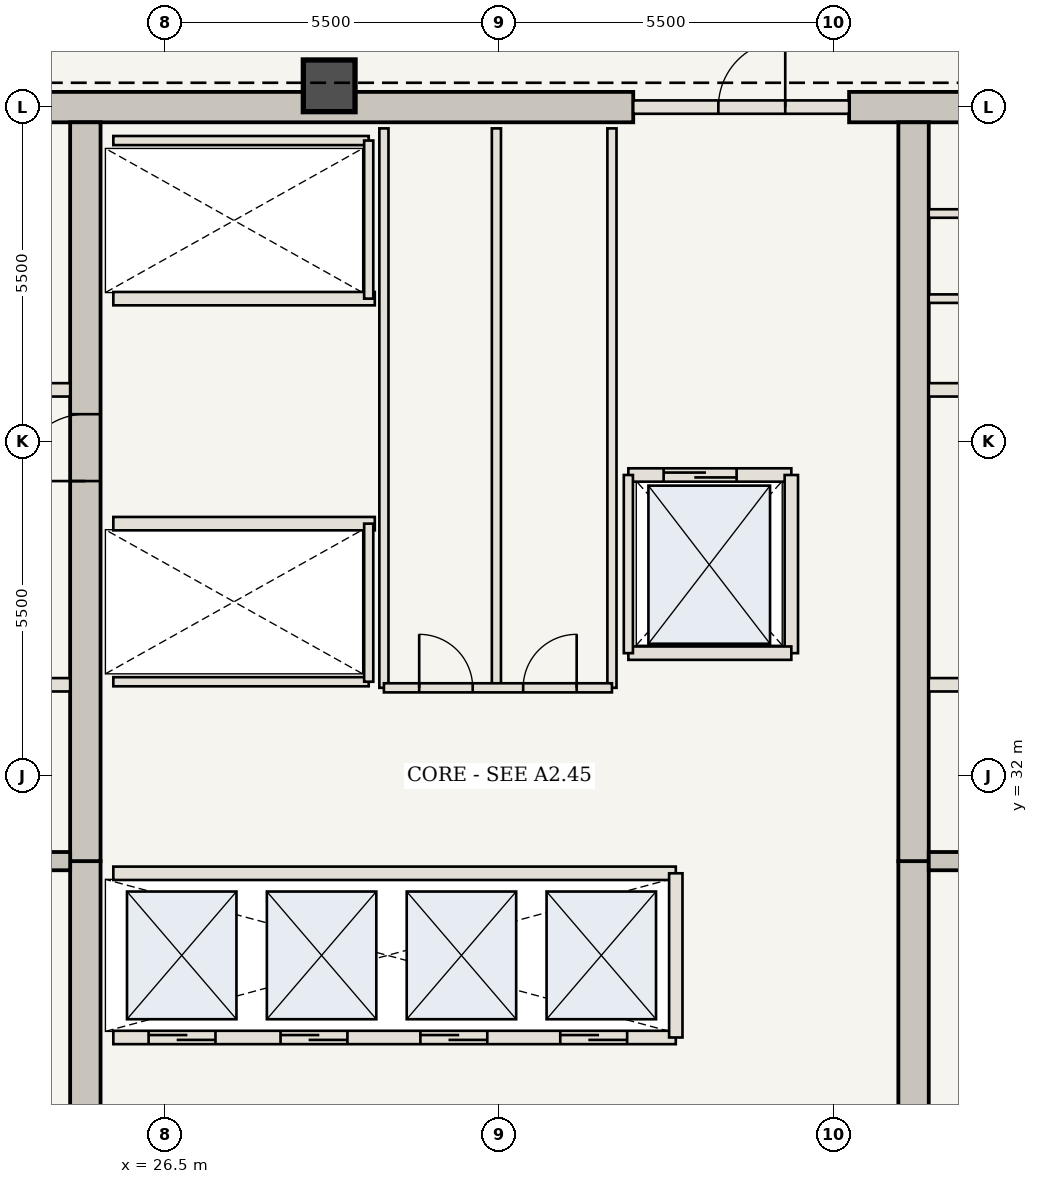
"""IFC4 building model, lengths in metres.
Left out: names, types, materials, properties, quantities, classifications, styles, units other than length and angle.
Written with IfcOpenShell. Run it as: python <this file> out.ifc"""

import sys

from ifc_helpers import new_model, si_unit, direction, frame, frame_2d, origin, origin_2d, place, context, subcontext, project, spatial, rectangle, extrude, element, fill, save


model = new_model("IFC4")
c1 = context("Model", 3, precision=1e-05, world=origin(), true_north=direction((0.0, 1.0)))
c2 = subcontext(c1, "Body", "Model", "MODEL_VIEW")
j1 = project(units=[si_unit("LENGTHUNIT", "METRE"), si_unit("PLANEANGLEUNIT", "RADIAN")], contexts=[c1])
p1 = place(None, origin())
s1 = spatial("IfcSite", under=j1, at=p1, CompositionType="ELEMENT")
p2 = place(p1, origin())
s2 = spatial("IfcBuilding", under=s1, at=p2, CompositionType="ELEMENT")
p3 = place(p2, frame((0.0, 0.0, 202.3)))
s3 = spatial("IfcBuildingStorey", under=s2, at=p3, CompositionType="ELEMENT", Elevation=202.3)
p4 = place(p3, frame((21.41, 43.0, 0.0), z_axis=(0.0, 0.0, 1.0), x_axis=(1.0, 0.0, 0.0)))
e1 = element("IfcWall", 1, at=p4, inside=s3, PredefinedType="SHEAR", context=c2, shape_type="SweptSolid", body=[
    extrude(rectangle(XDim=12.79, YDim=0.5, at=frame_2d((6.395, 0.0))), origin(), (0.0, 0.0, 1.0), 3.85),
])
p5 = place(p3, frame((37.75, 43.0, 0.0), z_axis=(0.0, 0.0, 1.0), x_axis=(1.0, 0.0, 0.0)))
e2 = element("IfcWall", 2, at=p5, inside=s3, PredefinedType="SHEAR", context=c2, shape_type="SweptSolid", body=[
    extrude(rectangle(XDim=4.84, YDim=0.5, at=frame_2d((2.42, 0.0))), origin(), (0.0, 0.0, 1.0), 3.85),
])
p6 = place(p3, frame((25.19, 21.2, 0.0), z_axis=(0.0, 0.0, 1.0), x_axis=(0.0, 1.0, 0.0)))
e3 = element("IfcWall", 3, at=p6, inside=s3, PredefinedType="SHEAR", context=c2, shape_type="SweptSolid", body=[
    extrude(rectangle(XDim=9.4, YDim=0.5, at=frame_2d((4.7, 0.0))), origin(), (0.0, 0.0, 1.0), 3.85),
])
p7 = place(p3, frame((25.19, 30.6, 0.0), z_axis=(0.0, 0.0, 1.0), x_axis=(0.0, 1.0, 0.0)))
e4 = element("IfcWall", 4, at=p7, inside=s3, PredefinedType="SHEAR", context=c2, shape_type="SweptSolid", body=[
    extrude(rectangle(XDim=12.15, YDim=0.5, at=frame_2d((6.075, 0.0))), origin(), (0.0, 0.0, 1.0), 3.85),
])
p8 = place(p7, frame((6.25, 0.0, 0.0)))
e5 = element("IfcOpeningElement", 5, at=p8, cuts=e4, PredefinedType="OPENING", context=c2, shape_type="SweptSolid", body=[
    extrude(rectangle(XDim=1.1, YDim=2.15, at=frame_2d((0.55, 1.075))), frame((0.0, 0.26, 0.0), z_axis=(0.0, -1.0, 0.0), x_axis=(1.0, 0.0, 0.0)), (0.0, 0.0, 1.0), 0.52),
])
p9 = place(p3, frame((38.81, 21.2, 0.0), z_axis=(0.0, 0.0, 1.0), x_axis=(0.0, 1.0, 0.0)))
e6 = element("IfcWall", 6, at=p9, inside=s3, PredefinedType="SHEAR", context=c2, shape_type="SweptSolid", body=[
    extrude(rectangle(XDim=9.4, YDim=0.5, at=frame_2d((4.7, 0.0))), origin(), (0.0, 0.0, 1.0), 3.85),
])
p10 = place(p3, frame((38.81, 30.6, 0.0), z_axis=(0.0, 0.0, 1.0), x_axis=(0.0, 1.0, 0.0)))
e7 = element("IfcWall", 7, at=p10, inside=s3, PredefinedType="SHEAR", context=c2, shape_type="SweptSolid", body=[
    extrude(rectangle(XDim=12.15, YDim=0.5, at=frame_2d((6.075, 0.0))), origin(), (0.0, 0.0, 1.0), 3.85),
])
p11 = place(p3, frame((29.2, 43.35, 0.0), z_axis=(0.0, 0.0, 1.0), x_axis=(1.0, 0.0, 0.0)))
e8 = element("IfcColumn", 8, at=p11, inside=s3, PredefinedType="COLUMN", context=c2, shape_type="SweptSolid", body=[
    extrude(rectangle(XDim=0.85, YDim=0.85, at=origin_2d()), origin(), (0.0, 0.0, 1.0), 3.85),
])
for number, where, z_axis, x_axis in (
    (9, (21.41, 30.6, 0.0), (0.0, 0.0, 1.0), (1.0, 0.0, 0.0)),
    (10, (39.06, 30.6, 0.0), (0.0, 0.0, 1.0), (1.0, 0.0, 0.0)),
):
    element("IfcWall", number, at=place(p3, frame(where, z_axis=z_axis, x_axis=x_axis)), inside=s3, PredefinedType="SHEAR", context=c2, shape_type="SweptSolid", body=[
        extrude(rectangle(XDim=3.53, YDim=0.3, at=frame_2d((1.765, 0.0))), origin(), (0.0, 0.0, 1.0), 3.685),
    ])
p12 = place(p3, frame((21.41, 33.5, 0.0), z_axis=(0.0, 0.0, 1.0), x_axis=(1.0, 0.0, 0.0)))
e11 = element("IfcWall", 11, at=p12, inside=s3, PredefinedType="STANDARD", context=c2, shape_type="SweptSolid", body=[
    extrude(rectangle(XDim=3.53, YDim=0.22, at=frame_2d((1.765, 0.0))), origin(), (0.0, 0.0, 1.0), 3.685),
])
p13 = place(p12, frame((0.75, 0.0, 0.0)))
e12 = element("IfcOpeningElement", 12, at=p13, cuts=e11, PredefinedType="OPENING", context=c2, shape_type="SweptSolid", body=[
    extrude(rectangle(XDim=1.2, YDim=2.2, at=frame_2d((0.6, 1.1))), frame((0.0, 0.12, 0.0), z_axis=(0.0, -1.0, 0.0), x_axis=(1.0, 0.0, 0.0)), (0.0, 0.0, 1.0), 0.24),
])
p14 = place(p3, frame((39.06, 33.5, 0.0), z_axis=(0.0, 0.0, 1.0), x_axis=(1.0, 0.0, 0.0)))
e13 = element("IfcWall", 13, at=p14, inside=s3, PredefinedType="STANDARD", context=c2, shape_type="SweptSolid", body=[
    extrude(rectangle(XDim=3.53, YDim=0.22, at=frame_2d((1.765, 0.0))), origin(), (0.0, 0.0, 1.0), 3.685),
])
p15 = place(p14, frame((1.55, 0.0, 0.0)))
e14 = element("IfcOpeningElement", 14, at=p15, cuts=e13, PredefinedType="OPENING", context=c2, shape_type="SweptSolid", body=[
    extrude(rectangle(XDim=1.2, YDim=2.2, at=frame_2d((0.6, 1.1))), frame((0.0, 0.12, 0.0), z_axis=(0.0, -1.0, 0.0), x_axis=(1.0, 0.0, 0.0)), (0.0, 0.0, 1.0), 0.24),
])
for number, where, z_axis, x_axis in (
    (15, (21.41, 38.35, 0.0), (0.0, 0.0, 1.0), (1.0, 0.0, 0.0)),
    (16, (39.06, 38.35, 0.0), (0.0, 0.0, 1.0), (1.0, 0.0, 0.0)),
):
    element("IfcWall", number, at=place(p3, frame(where, z_axis=z_axis, x_axis=x_axis)), inside=s3, PredefinedType="STANDARD", context=c2, shape_type="SweptSolid", body=[
        extrude(rectangle(XDim=3.53, YDim=0.22, at=frame_2d((1.765, 0.0))), origin(), (0.0, 0.0, 1.0), 3.685),
    ])
for number, where, z_axis, x_axis in (
    (17, (39.06, 39.85, 0.0), (0.0, 0.0, 1.0), (1.0, 0.0, 0.0)),
    (18, (39.06, 41.25, 0.0), (0.0, 0.0, 1.0), (1.0, 0.0, 0.0)),
):
    element("IfcWall", number, at=place(p3, frame(where, z_axis=z_axis, x_axis=x_axis)), inside=s3, PredefinedType="STANDARD", context=c2, shape_type="SweptSolid", body=[
        extrude(rectangle(XDim=3.53, YDim=0.14, at=frame_2d((1.765, 0.0))), origin(), (0.0, 0.0, 1.0), 3.685),
    ])
p16 = place(p3, frame((25.65, 27.7, 0.0), z_axis=(0.0, 0.0, 1.0), x_axis=(1.0, 0.0, 0.0)))
e19 = element("IfcWall", 19, at=p16, inside=s3, PredefinedType="STANDARD", context=c2, shape_type="SweptSolid", body=[
    extrude(rectangle(XDim=9.25, YDim=0.22, at=frame_2d((4.625, 0.0))), origin(), (0.0, 0.0, 1.0), 3.685),
])
p17 = place(p16, frame((0.58, 0.0, 0.0)))
e20 = element("IfcOpeningElement", 20, at=p17, cuts=e19, PredefinedType="OPENING", context=c2, shape_type="SweptSolid", body=[
    extrude(rectangle(XDim=1.1, YDim=2.15, at=frame_2d((0.55, 1.075))), frame((0.0, 0.12, 0.0), z_axis=(0.0, -1.0, 0.0), x_axis=(1.0, 0.0, 0.0)), (0.0, 0.0, 1.0), 0.24),
])
p18 = place(p16, frame((2.75, 0.0, 0.0)))
e21 = element("IfcOpeningElement", 21, at=p18, cuts=e19, PredefinedType="OPENING", context=c2, shape_type="SweptSolid", body=[
    extrude(rectangle(XDim=1.1, YDim=2.15, at=frame_2d((0.55, 1.075))), frame((0.0, 0.12, 0.0), z_axis=(0.0, -1.0, 0.0), x_axis=(1.0, 0.0, 0.0)), (0.0, 0.0, 1.0), 0.24),
])
p19 = place(p16, frame((5.05, 0.0, 0.0)))
e22 = element("IfcOpeningElement", 22, at=p19, cuts=e19, PredefinedType="OPENING", context=c2, shape_type="SweptSolid", body=[
    extrude(rectangle(XDim=1.1, YDim=2.15, at=frame_2d((0.55, 1.075))), frame((0.0, 0.12, 0.0), z_axis=(0.0, -1.0, 0.0), x_axis=(1.0, 0.0, 0.0)), (0.0, 0.0, 1.0), 0.24),
])
p20 = place(p16, frame((7.35, 0.0, 0.0)))
e23 = element("IfcOpeningElement", 23, at=p20, cuts=e19, PredefinedType="OPENING", context=c2, shape_type="SweptSolid", body=[
    extrude(rectangle(XDim=1.1, YDim=2.15, at=frame_2d((0.55, 1.075))), frame((0.0, 0.12, 0.0), z_axis=(0.0, -1.0, 0.0), x_axis=(1.0, 0.0, 0.0)), (0.0, 0.0, 1.0), 0.24),
])
p21 = place(p3, frame((25.65, 30.4, 0.0), z_axis=(0.0, 0.0, 1.0), x_axis=(1.0, 0.0, 0.0)))
e24 = element("IfcWall", 24, at=p21, inside=s3, PredefinedType="STANDARD", context=c2, shape_type="SweptSolid", body=[
    extrude(rectangle(XDim=9.25, YDim=0.22, at=frame_2d((4.625, 0.0))), origin(), (0.0, 0.0, 1.0), 3.685),
])
p22 = place(p3, frame((34.9, 27.7, 0.0), z_axis=(0.0, 0.0, 1.0), x_axis=(0.0, 1.0, 0.0)))
e25 = element("IfcWall", 25, at=p22, inside=s3, PredefinedType="STANDARD", context=c2, shape_type="SweptSolid", body=[
    extrude(rectangle(XDim=2.7, YDim=0.22, at=frame_2d((1.35, 0.0))), origin(), (0.0, 0.0, 1.0), 3.685),
])
p23 = place(p3, frame((25.65, 36.15, 0.0), z_axis=(0.0, 0.0, 1.0), x_axis=(1.0, 0.0, 0.0)))
e26 = element("IfcWall", 26, at=p23, inside=s3, PredefinedType="STANDARD", context=c2, shape_type="SweptSolid", body=[
    extrude(rectangle(XDim=4.3, YDim=0.22, at=frame_2d((2.15, 0.0))), origin(), (0.0, 0.0, 1.0), 3.685),
])
p24 = place(p3, frame((25.65, 33.55, 0.0), z_axis=(0.0, 0.0, 1.0), x_axis=(1.0, 0.0, 0.0)))
e27 = element("IfcWall", 27, at=p24, inside=s3, PredefinedType="STANDARD", context=c2, shape_type="SweptSolid", body=[
    extrude(rectangle(XDim=4.2, YDim=0.15, at=frame_2d((2.1, 0.0))), origin(), (0.0, 0.0, 1.0), 3.685),
])
p25 = place(p3, frame((29.85, 33.55, 0.0), z_axis=(0.0, 0.0, 1.0), x_axis=(0.0, 1.0, 0.0)))
e28 = element("IfcWall", 28, at=p25, inside=s3, PredefinedType="STANDARD", context=c2, shape_type="SweptSolid", body=[
    extrude(rectangle(XDim=2.6, YDim=0.15, at=frame_2d((1.3, 0.0))), origin(), (0.0, 0.0, 1.0), 3.685),
])
p26 = place(p3, frame((25.65, 39.85, 0.0), z_axis=(0.0, 0.0, 1.0), x_axis=(1.0, 0.0, 0.0)))
e29 = element("IfcWall", 29, at=p26, inside=s3, PredefinedType="STANDARD", context=c2, shape_type="SweptSolid", body=[
    extrude(rectangle(XDim=4.3, YDim=0.22, at=frame_2d((2.15, 0.0))), origin(), (0.0, 0.0, 1.0), 3.685),
])
p27 = place(p3, frame((25.65, 42.45, 0.0), z_axis=(0.0, 0.0, 1.0), x_axis=(1.0, 0.0, 0.0)))
e30 = element("IfcWall", 30, at=p27, inside=s3, PredefinedType="STANDARD", context=c2, shape_type="SweptSolid", body=[
    extrude(rectangle(XDim=4.2, YDim=0.15, at=frame_2d((2.1, 0.0))), origin(), (0.0, 0.0, 1.0), 3.685),
])
p28 = place(p3, frame((29.85, 39.85, 0.0), z_axis=(0.0, 0.0, 1.0), x_axis=(0.0, 1.0, 0.0)))
e31 = element("IfcWall", 31, at=p28, inside=s3, PredefinedType="STANDARD", context=c2, shape_type="SweptSolid", body=[
    extrude(rectangle(XDim=2.6, YDim=0.15, at=frame_2d((1.3, 0.0))), origin(), (0.0, 0.0, 1.0), 3.685),
])
for number, where, z_axis, x_axis in (
    (32, (30.1, 33.45, 0.0), (0.0, 0.0, 1.0), (0.0, 1.0, 0.0)),
    (33, (31.95, 33.45, 0.0), (0.0, 0.0, 1.0), (0.0, 1.0, 0.0)),
    (34, (33.85, 33.45, 0.0), (0.0, 0.0, 1.0), (0.0, 1.0, 0.0)),
):
    element("IfcWall", number, at=place(p3, frame(where, z_axis=z_axis, x_axis=x_axis)), inside=s3, PredefinedType="STANDARD", context=c2, shape_type="SweptSolid", body=[
        extrude(rectangle(XDim=9.2, YDim=0.15, at=frame_2d((4.6, 0.0))), origin(), (0.0, 0.0, 1.0), 3.685),
    ])
p29 = place(p3, frame((30.1, 33.45, 0.0), z_axis=(0.0, 0.0, 1.0), x_axis=(1.0, 0.0, 0.0)))
e35 = element("IfcWall", 35, at=p29, inside=s3, PredefinedType="STANDARD", context=c2, shape_type="SweptSolid", body=[
    extrude(rectangle(XDim=3.75, YDim=0.15, at=frame_2d((1.875, 0.0))), origin(), (0.0, 0.0, 1.0), 3.685),
])
p30 = place(p29, frame((0.58, 0.0, 0.0)))
e36 = element("IfcOpeningElement", 36, at=p30, cuts=e35, PredefinedType="OPENING", context=c2, shape_type="SweptSolid", body=[
    extrude(rectangle(XDim=0.88, YDim=2.1, at=frame_2d((0.44, 1.05))), frame((0.0, 0.085, 0.0), z_axis=(0.0, -1.0, 0.0), x_axis=(1.0, 0.0, 0.0)), (0.0, 0.0, 1.0), 0.17),
])
p31 = place(p29, frame((2.29, 0.0, 0.0)))
e37 = element("IfcOpeningElement", 37, at=p31, cuts=e35, PredefinedType="OPENING", context=c2, shape_type="SweptSolid", body=[
    extrude(rectangle(XDim=0.88, YDim=2.1, at=frame_2d((0.44, 1.05))), frame((0.0, 0.085, 0.0), z_axis=(0.0, -1.0, 0.0), x_axis=(1.0, 0.0, 0.0)), (0.0, 0.0, 1.0), 0.17),
])
p32 = place(p3, frame((34.2, 43.0, 0.0), z_axis=(0.0, 0.0, 1.0), x_axis=(1.0, 0.0, 0.0)))
e38 = element("IfcWall", 38, at=p32, inside=s3, PredefinedType="STANDARD", context=c2, shape_type="SweptSolid", body=[
    extrude(rectangle(XDim=3.55, YDim=0.22, at=frame_2d((1.775, 0.0))), origin(), (0.0, 0.0, 1.0), 3.685),
])
p33 = place(p32, frame((1.4, 0.0, 0.0)))
e39 = element("IfcOpeningElement", 39, at=p33, cuts=e38, PredefinedType="OPENING", context=c2, shape_type="SweptSolid", body=[
    extrude(rectangle(XDim=1.1, YDim=2.15, at=frame_2d((0.55, 1.075))), frame((0.0, 0.12, 0.0), z_axis=(0.0, -1.0, 0.0), x_axis=(1.0, 0.0, 0.0)), (0.0, 0.0, 1.0), 0.24),
])
p34 = place(p3, frame((34.12, 36.95, 0.0), z_axis=(0.0, 0.0, 1.0), x_axis=(1.0, 0.0, 0.0)))
e40 = element("IfcWall", 40, at=p34, inside=s3, PredefinedType="STANDARD", context=c2, shape_type="SweptSolid", body=[
    extrude(rectangle(XDim=2.68, YDim=0.22, at=frame_2d((1.34, 0.0))), origin(), (0.0, 0.0, 1.0), 3.685),
])
p35 = place(p34, frame((0.58, 0.0, 0.0)))
e41 = element("IfcOpeningElement", 41, at=p35, cuts=e40, PredefinedType="OPENING", context=c2, shape_type="SweptSolid", body=[
    extrude(rectangle(XDim=1.2, YDim=2.2, at=frame_2d((0.6, 1.1))), frame((0.0, 0.12, 0.0), z_axis=(0.0, -1.0, 0.0), x_axis=(1.0, 0.0, 0.0)), (0.0, 0.0, 1.0), 0.24),
])
p36 = place(p3, frame((36.8, 34.02, 0.0), z_axis=(0.0, 0.0, 1.0), x_axis=(0.0, 1.0, 0.0)))
e42 = element("IfcWall", 42, at=p36, inside=s3, PredefinedType="STANDARD", context=c2, shape_type="SweptSolid", body=[
    extrude(rectangle(XDim=2.93, YDim=0.22, at=frame_2d((1.465, 0.0))), origin(), (0.0, 0.0, 1.0), 3.685),
])
p37 = place(p3, frame((34.12, 34.02, 0.0), z_axis=(0.0, 0.0, 1.0), x_axis=(1.0, 0.0, 0.0)))
e43 = element("IfcWall", 43, at=p37, inside=s3, PredefinedType="STANDARD", context=c2, shape_type="SweptSolid", body=[
    extrude(rectangle(XDim=2.68, YDim=0.22, at=frame_2d((1.34, 0.0))), origin(), (0.0, 0.0, 1.0), 3.685),
])
p38 = place(p3, frame((34.12, 34.02, 0.0), z_axis=(0.0, 0.0, 1.0), x_axis=(0.0, 1.0, 0.0)))
e44 = element("IfcWall", 44, at=p38, inside=s3, PredefinedType="STANDARD", context=c2, shape_type="SweptSolid", body=[
    extrude(rectangle(XDim=2.93, YDim=0.15, at=frame_2d((1.465, 0.0))), origin(), (0.0, 0.0, 1.0), 3.685),
])
p39 = place(p8, origin())
e45 = element("IfcDoor", 45, at=p39, inside=s3, OperationType="SINGLE_SWING_LEFT", PredefinedType="DOOR", context=c2, shape_type="SweptSolid", body=[
    extrude(rectangle(XDim=1.1, YDim=2.15, at=frame_2d((0.55, 1.075))), frame((0.0, 0.025, 0.0), z_axis=(0.0, -1.0, 0.0), x_axis=(1.0, 0.0, 0.0)), (0.0, 0.0, 1.0), 0.05),
])
fill(e5, e45)
p40 = place(p17, origin())
e46 = element("IfcDoor", 46, at=p40, inside=s3, OperationType="DOUBLE_DOOR_SLIDING", PredefinedType="DOOR", context=c2, shape_type="SweptSolid", body=[
    extrude(rectangle(XDim=1.1, YDim=2.15, at=frame_2d((0.55, 1.075))), frame((0.0, 0.025, 0.0), z_axis=(0.0, -1.0, 0.0), x_axis=(1.0, 0.0, 0.0)), (0.0, 0.0, 1.0), 0.05),
])
fill(e20, e46)
p41 = place(p18, origin())
e47 = element("IfcDoor", 47, at=p41, inside=s3, OperationType="DOUBLE_DOOR_SLIDING", PredefinedType="DOOR", context=c2, shape_type="SweptSolid", body=[
    extrude(rectangle(XDim=1.1, YDim=2.15, at=frame_2d((0.55, 1.075))), frame((0.0, 0.025, 0.0), z_axis=(0.0, -1.0, 0.0), x_axis=(1.0, 0.0, 0.0)), (0.0, 0.0, 1.0), 0.05),
])
fill(e21, e47)
p42 = place(p19, origin())
e48 = element("IfcDoor", 48, at=p42, inside=s3, OperationType="DOUBLE_DOOR_SLIDING", PredefinedType="DOOR", context=c2, shape_type="SweptSolid", body=[
    extrude(rectangle(XDim=1.1, YDim=2.15, at=frame_2d((0.55, 1.075))), frame((0.0, 0.025, 0.0), z_axis=(0.0, -1.0, 0.0), x_axis=(1.0, 0.0, 0.0)), (0.0, 0.0, 1.0), 0.05),
])
fill(e22, e48)
p43 = place(p20, origin())
e49 = element("IfcDoor", 49, at=p43, inside=s3, OperationType="DOUBLE_DOOR_SLIDING", PredefinedType="DOOR", context=c2, shape_type="SweptSolid", body=[
    extrude(rectangle(XDim=1.1, YDim=2.15, at=frame_2d((0.55, 1.075))), frame((0.0, 0.025, 0.0), z_axis=(0.0, -1.0, 0.0), x_axis=(1.0, 0.0, 0.0)), (0.0, 0.0, 1.0), 0.05),
])
fill(e23, e49)
p44 = place(p30, origin())
e50 = element("IfcDoor", 50, at=p44, inside=s3, OperationType="SINGLE_SWING_LEFT", PredefinedType="DOOR", context=c2, shape_type="SweptSolid", body=[
    extrude(rectangle(XDim=0.88, YDim=2.1, at=frame_2d((0.44, 1.05))), frame((0.0, 0.025, 0.0), z_axis=(0.0, -1.0, 0.0), x_axis=(1.0, 0.0, 0.0)), (0.0, 0.0, 1.0), 0.05),
])
fill(e36, e50)
p45 = place(p31, origin())
e51 = element("IfcDoor", 51, at=p45, inside=s3, OperationType="SINGLE_SWING_RIGHT", PredefinedType="DOOR", context=c2, shape_type="SweptSolid", body=[
    extrude(rectangle(XDim=0.88, YDim=2.1, at=frame_2d((0.44, 1.05))), frame((0.0, 0.025, 0.0), z_axis=(0.0, -1.0, 0.0), x_axis=(1.0, 0.0, 0.0)), (0.0, 0.0, 1.0), 0.05),
])
fill(e37, e51)
p46 = place(p33, origin())
e52 = element("IfcDoor", 52, at=p46, inside=s3, OperationType="SINGLE_SWING_RIGHT", PredefinedType="DOOR", context=c2, shape_type="SweptSolid", body=[
    extrude(rectangle(XDim=1.1, YDim=2.15, at=frame_2d((0.55, 1.075))), frame((0.0, 0.025, 0.0), z_axis=(0.0, -1.0, 0.0), x_axis=(1.0, 0.0, 0.0)), (0.0, 0.0, 1.0), 0.05),
])
fill(e39, e52)
p47 = place(p35, origin())
e53 = element("IfcDoor", 53, at=p47, inside=s3, OperationType="DOUBLE_DOOR_SLIDING", PredefinedType="DOOR", context=c2, shape_type="SweptSolid", body=[
    extrude(rectangle(XDim=1.2, YDim=2.2, at=frame_2d((0.6, 1.1))), frame((0.0, 0.025, 0.0), z_axis=(0.0, -1.0, 0.0), x_axis=(1.0, 0.0, 0.0)), (0.0, 0.0, 1.0), 0.05),
])
fill(e41, e53)
save(model, sys.argv[1])
